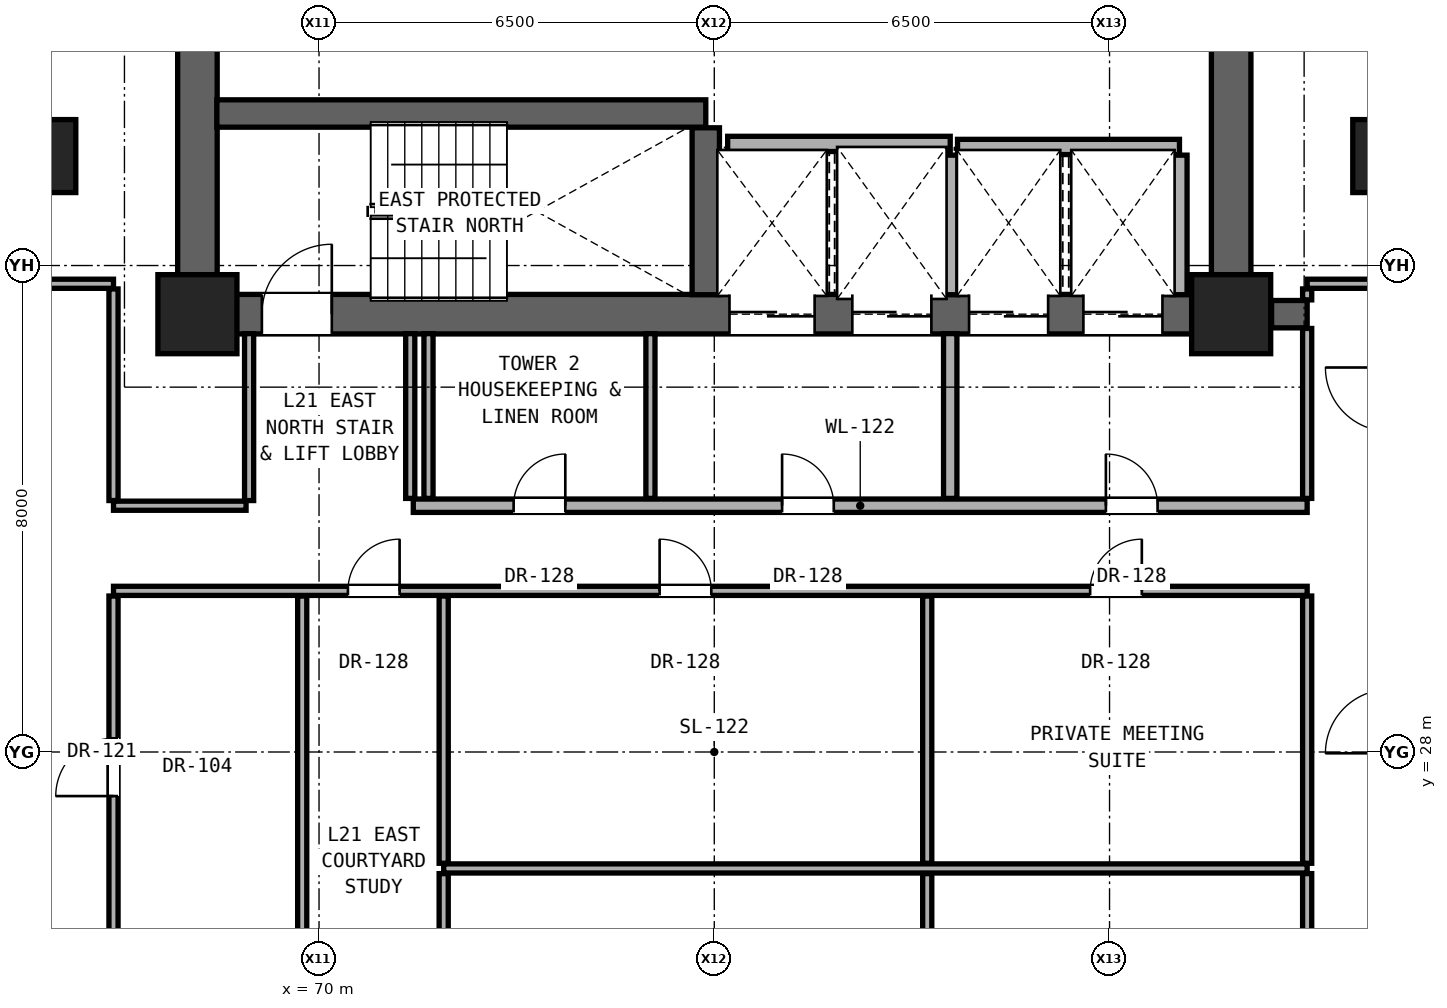
"""IFC4 building model, lengths in metres.
Left out: names, types, materials, properties, quantities, classifications, styles, units other than length and angle.
Written with IfcOpenShell. Run it as: python <this file> out.ifc"""

import sys

from ifc_helpers import new_model, si_unit, direction, frame, frame_2d, origin, origin_2d, place, context, subcontext, project, spatial, rectangle, extrude, element, fill, save


model = new_model("IFC4")
c1 = context("Model", 3, precision=1e-05, world=origin(), true_north=direction((0.0, 1.0)))
c2 = subcontext(c1, "Body", "Model", "MODEL_VIEW")
j1 = project(units=[si_unit("LENGTHUNIT", "METRE"), si_unit("PLANEANGLEUNIT", "RADIAN")], contexts=[c1])
p1 = place(None, origin())
s1 = spatial("IfcSite", under=j1, at=p1, CompositionType="ELEMENT")
p2 = place(p1, origin())
s2 = spatial("IfcBuilding", under=s1, at=p2, CompositionType="ELEMENT")
p3 = place(p2, frame((0.0, 0.0, 75.2)))
s3 = spatial("IfcBuildingStorey", under=s2, at=p3, CompositionType="ELEMENT", Elevation=75.2)
for number, where, z_axis, x_axis in (
    (1, (68.0, 35.2, 0.0), (0.0, 0.0, 1.0), (1.0, 0.0, 0.0)),
    (2, (85.0, 35.2, 0.0), (0.0, 0.0, 1.0), (1.0, 0.0, 0.0)),
):
    element("IfcColumn", number, at=place(p3, frame(where, z_axis=z_axis, x_axis=x_axis)), inside=s3, PredefinedType="COLUMN", context=c2, shape_type="SweptSolid", body=[
        extrude(rectangle(XDim=1.3, YDim=1.3, at=origin_2d()), origin(), (0.0, 0.0, 1.0), 3.3),
    ])
for number, where, z_axis, x_axis in (
    (3, (65.6, 37.8, 0.0), (0.0, 0.0, 1.0), (1.0, 0.0, 0.0)),
    (4, (87.4, 37.8, 0.0), (0.0, 0.0, 1.0), (1.0, 0.0, 0.0)),
):
    element("IfcColumn", number, at=place(p3, frame(where, z_axis=z_axis, x_axis=x_axis)), inside=s3, PredefinedType="PILASTER", context=c2, shape_type="SweptSolid", body=[
        extrude(rectangle(XDim=0.8, YDim=1.2, at=origin_2d()), origin(), (0.0, 0.0, 1.0), 3.3),
    ])
for number, where, z_axis, x_axis in (
    (5, (68.0, 35.2, 0.0), (0.0, 0.0, 1.0), (0.0, 1.0, 0.0)),
    (6, (85.0, 35.2, 0.0), (0.0, 0.0, 1.0), (0.0, 1.0, 0.0)),
):
    element("IfcWall", number, at=place(p3, frame(where, z_axis=z_axis, x_axis=x_axis)), inside=s3, PredefinedType="SHEAR", context=c2, shape_type="SweptSolid", body=[
        extrude(rectangle(XDim=5.6, YDim=0.65, at=frame_2d((2.8, 0.0))), origin(), (0.0, 0.0, 1.0), 3.06),
    ])
p4 = place(p3, frame((68.0, 35.2, 0.0), z_axis=(0.0, 0.0, 1.0), x_axis=(1.0, 0.0, 0.0)))
e7 = element("IfcWall", 7, at=p4, inside=s3, PredefinedType="SHEAR", context=c2, shape_type="SweptSolid", body=[
    extrude(rectangle(XDim=17.0, YDim=0.65, at=frame_2d((8.5, 0.0))), origin(), (0.0, 0.0, 1.0), 3.06),
])
p5 = place(p4, frame((1.06, 0.0, 0.0)))
e8 = element("IfcOpeningElement", 8, at=p5, cuts=e7, PredefinedType="OPENING", context=c2, shape_type="SweptSolid", body=[
    extrude(rectangle(XDim=1.15, YDim=2.2, at=frame_2d((0.575, 1.1))), frame((0.0, 0.335, 0.0), z_axis=(0.0, -1.0, 0.0), x_axis=(1.0, 0.0, 0.0)), (0.0, 0.0, 1.0), 0.67),
])
p6 = place(p4, frame((8.75, 0.0, 0.0)))
e9 = element("IfcOpeningElement", 9, at=p6, cuts=e7, PredefinedType="OPENING", context=c2, shape_type="SweptSolid", body=[
    extrude(rectangle(XDim=1.4, YDim=2.35, at=frame_2d((0.7, 1.175))), frame((0.0, 0.335, 0.0), z_axis=(0.0, -1.0, 0.0), x_axis=(1.0, 0.0, 0.0)), (0.0, 0.0, 1.0), 0.67),
])
p7 = place(p4, frame((10.77, 0.0, 0.0)))
e10 = element("IfcOpeningElement", 10, at=p7, cuts=e7, PredefinedType="OPENING", context=c2, shape_type="SweptSolid", body=[
    extrude(rectangle(XDim=1.3, YDim=2.3, at=frame_2d((0.65, 1.15))), frame((0.0, 0.335, 0.0), z_axis=(0.0, -1.0, 0.0), x_axis=(1.0, 0.0, 0.0)), (0.0, 0.0, 1.0), 0.67),
])
p8 = place(p4, frame((12.69, 0.0, 0.0)))
e11 = element("IfcOpeningElement", 11, at=p8, cuts=e7, PredefinedType="OPENING", context=c2, shape_type="SweptSolid", body=[
    extrude(rectangle(XDim=1.3, YDim=2.3, at=frame_2d((0.65, 1.15))), frame((0.0, 0.335, 0.0), z_axis=(0.0, -1.0, 0.0), x_axis=(1.0, 0.0, 0.0)), (0.0, 0.0, 1.0), 0.67),
])
p9 = place(p4, frame((14.57, 0.0, 0.0)))
e12 = element("IfcOpeningElement", 12, at=p9, cuts=e7, PredefinedType="OPENING", context=c2, shape_type="SweptSolid", body=[
    extrude(rectangle(XDim=1.3, YDim=2.3, at=frame_2d((0.65, 1.15))), frame((0.0, 0.335, 0.0), z_axis=(0.0, -1.0, 0.0), x_axis=(1.0, 0.0, 0.0)), (0.0, 0.0, 1.0), 0.67),
])
p10 = place(p3, frame((72.05, 26.085, 0.0), z_axis=(0.0, 0.0, 1.0), x_axis=(1.0, 0.0, 0.0)))
e13 = element("IfcWall", 13, at=p10, inside=s3, PredefinedType="PARTITIONING", context=c2, shape_type="SweptSolid", body=[
    extrude(rectangle(XDim=14.2, YDim=0.15, at=frame_2d((7.1, 0.0))), origin(), (0.0, 0.0, 1.0), 2.125),
])
p11 = place(p3, frame((66.62, 30.65, 0.0), z_axis=(0.0, 0.0, 1.0), x_axis=(1.0, 0.0, 0.0)))
e14 = element("IfcWall", 14, at=p11, inside=s3, PredefinedType="PARTITIONING", context=c2, shape_type="SweptSolid", body=[
    extrude(rectangle(XDim=19.63, YDim=0.15, at=frame_2d((9.815, 0.0))), origin(), (0.0, 0.0, 1.0), 2.125),
])
p12 = place(p11, frame((3.855, 0.0, 0.0)))
e15 = element("IfcOpeningElement", 15, at=p12, cuts=e14, PredefinedType="OPENING", context=c2, shape_type="SweptSolid", body=[
    extrude(rectangle(XDim=0.85, YDim=2.01, at=frame_2d((0.425, 1.005))), frame((0.0, 0.085, 0.0), z_axis=(0.0, -1.0, 0.0), x_axis=(1.0, 0.0, 0.0)), (0.0, 0.0, 1.0), 0.17),
])
p13 = place(p11, frame((8.981, 0.0, 0.0)))
e16 = element("IfcOpeningElement", 16, at=p13, cuts=e14, PredefinedType="OPENING", context=c2, shape_type="SweptSolid", body=[
    extrude(rectangle(XDim=0.85, YDim=2.01, at=frame_2d((0.425, 1.005))), frame((0.0, 0.085, 0.0), z_axis=(0.0, -1.0, 0.0), x_axis=(1.0, 0.0, 0.0)), (0.0, 0.0, 1.0), 0.17),
])
p14 = place(p11, frame((16.061, 0.0, 0.0)))
e17 = element("IfcOpeningElement", 17, at=p14, cuts=e14, PredefinedType="OPENING", context=c2, shape_type="SweptSolid", body=[
    extrude(rectangle(XDim=0.85, YDim=2.01, at=frame_2d((0.425, 1.005))), frame((0.0, 0.085, 0.0), z_axis=(0.0, -1.0, 0.0), x_axis=(1.0, 0.0, 0.0)), (0.0, 0.0, 1.0), 0.17),
])
p15 = place(p3, frame((66.62, 32.05, 0.0), z_axis=(0.0, 0.0, 1.0), x_axis=(1.0, 0.0, 0.0)))
e18 = element("IfcWall", 18, at=p15, inside=s3, PredefinedType="PARTITIONING", context=c2, shape_type="SweptSolid", body=[
    extrude(rectangle(XDim=2.18, YDim=0.15, at=frame_2d((1.09, 0.0))), origin(), (0.0, 0.0, 1.0), 2.125),
])
p16 = place(p3, frame((71.55, 32.05, 0.0), z_axis=(0.0, 0.0, 1.0), x_axis=(1.0, 0.0, 0.0)))
e19 = element("IfcWall", 19, at=p16, inside=s3, PredefinedType="SOLIDWALL", context=c2, shape_type="SweptSolid", body=[
    extrude(rectangle(XDim=14.7, YDim=0.22, at=frame_2d((7.35, 0.0))), origin(), (0.0, 0.0, 1.0), 2.125),
])
p17 = place(p16, frame((11.39, 0.0, 0.0)))
e20 = element("IfcOpeningElement", 20, at=p17, cuts=e19, PredefinedType="OPENING", context=c2, shape_type="SweptSolid", body=[
    extrude(rectangle(XDim=0.85, YDim=2.01, at=frame_2d((0.425, 1.005))), frame((0.0, 0.12, 0.0), z_axis=(0.0, -1.0, 0.0), x_axis=(1.0, 0.0, 0.0)), (0.0, 0.0, 1.0), 0.24),
])
p18 = place(p16, frame((6.065, 0.0, 0.0)))
e21 = element("IfcOpeningElement", 21, at=p18, cuts=e19, PredefinedType="OPENING", context=c2, shape_type="SweptSolid", body=[
    extrude(rectangle(XDim=0.85, YDim=2.01, at=frame_2d((0.425, 1.005))), frame((0.0, 0.12, 0.0), z_axis=(0.0, -1.0, 0.0), x_axis=(1.0, 0.0, 0.0)), (0.0, 0.0, 1.0), 0.24),
])
p19 = place(p16, frame((1.65, 0.0, 0.0)))
e22 = element("IfcOpeningElement", 22, at=p19, cuts=e19, PredefinedType="OPENING", context=c2, shape_type="SweptSolid", body=[
    extrude(rectangle(XDim=0.85, YDim=2.01, at=frame_2d((0.425, 1.005))), frame((0.0, 0.12, 0.0), z_axis=(0.0, -1.0, 0.0), x_axis=(1.0, 0.0, 0.0)), (0.0, 0.0, 1.0), 0.24),
])
p20 = place(p3, frame((85.665, 35.2, 0.0), z_axis=(0.0, 0.0, 1.0), x_axis=(1.0, 0.0, 0.0)))
e23 = element("IfcWall", 23, at=p20, inside=s3, PredefinedType="SHEAR", context=c2, shape_type="SweptSolid", body=[
    extrude(rectangle(XDim=0.585, YDim=0.45, at=frame_2d((0.292, 0.0))), origin(), (0.0, 0.0, 1.0), 3.06),
])
p21 = place(p3, frame((65.25, 35.7, 0.0), z_axis=(0.0, 0.0, 1.0), x_axis=(1.0, 0.0, 0.0)))
e24 = element("IfcWall", 24, at=p21, inside=s3, PredefinedType="PARTITIONING", context=c2, shape_type="SweptSolid", body=[
    extrude(rectangle(XDim=1.37, YDim=0.15, at=frame_2d((0.685, 0.0))), origin(), (0.0, 0.0, 1.0), 3.06),
])
p22 = place(p3, frame((86.25, 35.7, 0.0), z_axis=(0.0, 0.0, 1.0), x_axis=(1.0, 0.0, 0.0)))
e25 = element("IfcWall", 25, at=p22, inside=s3, PredefinedType="PARTITIONING", context=c2, shape_type="SweptSolid", body=[
    extrude(rectangle(XDim=1.35, YDim=0.15, at=frame_2d((0.675, 0.0))), origin(), (0.0, 0.0, 1.0), 3.06),
])
p23 = place(p3, frame((80.5, 37.95, 0.0), z_axis=(0.0, 0.0, 1.0), x_axis=(1.0, 0.0, 0.0)))
e26 = element("IfcWall", 26, at=p23, inside=s3, PredefinedType="SOLIDWALL", context=c2, shape_type="SweptSolid", body=[
    extrude(rectangle(XDim=3.65, YDim=0.25, at=frame_2d((1.825, 0.0))), origin(), (0.0, 0.0, 1.0), 3.06),
])
p24 = place(p3, frame((76.72, 38.0, 0.0), z_axis=(0.0, 0.0, 1.0), x_axis=(1.0, 0.0, 0.0)))
e27 = element("IfcWall", 27, at=p24, inside=s3, PredefinedType="SOLIDWALL", context=c2, shape_type="SweptSolid", body=[
    extrude(rectangle(XDim=3.66, YDim=0.25, at=frame_2d((1.83, 0.0))), origin(), (0.0, 0.0, 1.0), 3.06),
])
p25 = place(p3, frame((68.32, 38.5, 0.0), z_axis=(0.0, 0.0, 1.0), x_axis=(1.0, 0.0, 0.0)))
e28 = element("IfcWall", 28, at=p25, inside=s3, PredefinedType="SHEAR", context=c2, shape_type="SweptSolid", body=[
    extrude(rectangle(XDim=8.04, YDim=0.45, at=frame_2d((4.02, 0.0))), origin(), (0.0, 0.0, 1.0), 3.06),
])
p26 = place(p3, frame((66.62, 24.935, 0.0), z_axis=(0.0, 0.0, 1.0), x_axis=(0.0, 1.0, 0.0)))
e29 = element("IfcWall", 29, at=p26, inside=s3, PredefinedType="PARTITIONING", context=c2, shape_type="SweptSolid", body=[
    extrude(rectangle(XDim=5.63, YDim=0.15, at=frame_2d((2.815, 0.0))), origin(), (0.0, 0.0, 1.0), 2.279),
])
p27 = place(p26, frame((2.34, 0.0, 0.0)))
e30 = element("IfcOpeningElement", 30, at=p27, cuts=e29, PredefinedType="OPENING", context=c2, shape_type="SweptSolid", body=[
    extrude(rectangle(XDim=0.95, YDim=2.15, at=frame_2d((0.475, 1.075))), frame((0.0, 0.085, 0.0), z_axis=(0.0, -1.0, 0.0), x_axis=(1.0, 0.0, 0.0)), (0.0, 0.0, 1.0), 0.17),
])
p28 = place(p3, frame((66.62, 32.135, 0.0), z_axis=(0.0, 0.0, 1.0), x_axis=(0.0, 1.0, 0.0)))
e31 = element("IfcWall", 31, at=p28, inside=s3, PredefinedType="PARTITIONING", context=c2, shape_type="SweptSolid", body=[
    extrude(rectangle(XDim=3.48, YDim=0.15, at=frame_2d((1.74, 0.0))), origin(), (0.0, 0.0, 1.0), 2.452),
])
p29 = place(p3, frame((68.85, 32.135, 0.0), z_axis=(0.0, 0.0, 1.0), x_axis=(0.0, 1.0, 0.0)))
e32 = element("IfcWall", 32, at=p29, inside=s3, PredefinedType="PARTITIONING", context=c2, shape_type="SweptSolid", body=[
    extrude(rectangle(XDim=2.745, YDim=0.15, at=frame_2d((1.373, 0.0))), origin(), (0.0, 0.0, 1.0), 3.06),
])
p30 = place(p3, frame((69.723, 24.935, 0.0), z_axis=(0.0, 0.0, 1.0), x_axis=(0.0, 1.0, 0.0)))
e33 = element("IfcWall", 33, at=p30, inside=s3, PredefinedType="PARTITIONING", context=c2, shape_type="SweptSolid", body=[
    extrude(rectangle(XDim=5.63, YDim=0.15, at=frame_2d((2.815, 0.0))), origin(), (0.0, 0.0, 1.0), 2.125),
])
for number, where, z_axis, x_axis in (
    (34, (71.5, 32.17, 0.0), (0.0, 0.0, 1.0), (0.0, 1.0, 0.0)),
    (35, (71.8, 32.17, 0.0), (0.0, 0.0, 1.0), (0.0, 1.0, 0.0)),
):
    element("IfcWall", number, at=place(p3, frame(where, z_axis=z_axis, x_axis=x_axis)), inside=s3, PredefinedType="PARTITIONING", context=c2, shape_type="SweptSolid", body=[
        extrude(rectangle(XDim=2.71, YDim=0.15, at=frame_2d((1.355, 0.0))), origin(), (0.0, 0.0, 1.0), 3.06),
    ])
p31 = place(p3, frame((72.05, 22.435, 0.0), z_axis=(0.0, 0.0, 1.0), x_axis=(0.0, 1.0, 0.0)))
e36 = element("IfcWall", 36, at=p31, inside=s3, PredefinedType="PARTITIONING", context=c2, shape_type="SweptSolid", body=[
    extrude(rectangle(XDim=3.565, YDim=0.15, at=frame_2d((1.782, 0.0))), origin(), (0.0, 0.0, 1.0), 2.589),
])
p32 = place(p3, frame((72.05, 26.17, 0.0), z_axis=(0.0, 0.0, 1.0), x_axis=(0.0, 1.0, 0.0)))
e37 = element("IfcWall", 37, at=p32, inside=s3, PredefinedType="PARTITIONING", context=c2, shape_type="SweptSolid", body=[
    extrude(rectangle(XDim=4.395, YDim=0.15, at=frame_2d((2.198, 0.0))), origin(), (0.0, 0.0, 1.0), 2.125),
])
p33 = place(p3, frame((75.45, 32.17, 0.0), z_axis=(0.0, 0.0, 1.0), x_axis=(0.0, 1.0, 0.0)))
e38 = element("IfcWall", 38, at=p33, inside=s3, PredefinedType="PARTITIONING", context=c2, shape_type="SweptSolid", body=[
    extrude(rectangle(XDim=2.71, YDim=0.15, at=frame_2d((1.355, 0.0))), origin(), (0.0, 0.0, 1.0), 3.06),
])
p34 = place(p3, frame((76.36, 35.52, 0.0), z_axis=(0.0, 0.0, 1.0), x_axis=(0.0, 1.0, 0.0)))
e39 = element("IfcWall", 39, at=p34, inside=s3, PredefinedType="SHEAR", context=c2, shape_type="SweptSolid", body=[
    extrude(rectangle(XDim=2.745, YDim=0.45, at=frame_2d((1.373, 0.0))), origin(), (0.0, 0.0, 1.0), 3.06),
])
p35 = place(p3, frame((80.002, 22.435, 0.0), z_axis=(0.0, 0.0, 1.0), x_axis=(0.0, 1.0, 0.0)))
e40 = element("IfcWall", 40, at=p35, inside=s3, PredefinedType="PARTITIONING", context=c2, shape_type="SweptSolid", body=[
    extrude(rectangle(XDim=3.565, YDim=0.15, at=frame_2d((1.782, 0.0))), origin(), (0.0, 0.0, 1.0), 3.06),
])
p36 = place(p3, frame((80.002, 26.17, 0.0), z_axis=(0.0, 0.0, 1.0), x_axis=(0.0, 1.0, 0.0)))
e41 = element("IfcWall", 41, at=p36, inside=s3, PredefinedType="PARTITIONING", context=c2, shape_type="SweptSolid", body=[
    extrude(rectangle(XDim=4.395, YDim=0.15, at=frame_2d((2.198, 0.0))), origin(), (0.0, 0.0, 1.0), 2.125),
])
p37 = place(p3, frame((80.38, 32.17, 0.0), z_axis=(0.0, 0.0, 1.0), x_axis=(0.0, 1.0, 0.0)))
e42 = element("IfcWall", 42, at=p37, inside=s3, PredefinedType="SOLIDWALL", context=c2, shape_type="SweptSolid", body=[
    extrude(rectangle(XDim=2.71, YDim=0.22, at=frame_2d((1.355, 0.0))), origin(), (0.0, 0.0, 1.0), 3.06),
])
for number, where, z_axis, x_axis in (
    (43, (80.38, 35.52, 0.0), (0.0, 0.0, 1.0), (0.0, 1.0, 0.0)),
    (44, (84.15, 35.52, 0.0), (0.0, 0.0, 1.0), (0.0, 1.0, 0.0)),
):
    element("IfcWall", number, at=place(p3, frame(where, z_axis=z_axis, x_axis=x_axis)), inside=s3, PredefinedType="SOLIDWALL", context=c2, shape_type="SweptSolid", body=[
        extrude(rectangle(XDim=2.295, YDim=0.25, at=frame_2d((1.147, 0.0))), origin(), (0.0, 0.0, 1.0), 3.06),
    ])
p38 = place(p3, frame((86.25, 22.435, 0.0), z_axis=(0.0, 0.0, 1.0), x_axis=(0.0, 1.0, 0.0)))
e45 = element("IfcWall", 45, at=p38, inside=s3, PredefinedType="PARTITIONING", context=c2, shape_type="SweptSolid", body=[
    extrude(rectangle(XDim=3.565, YDim=0.15, at=frame_2d((1.782, 0.0))), origin(), (0.0, 0.0, 1.0), 3.06),
])
p39 = place(p3, frame((86.25, 26.17, 0.0), z_axis=(0.0, 0.0, 1.0), x_axis=(0.0, 1.0, 0.0)))
e46 = element("IfcWall", 46, at=p39, inside=s3, PredefinedType="PARTITIONING", context=c2, shape_type="SweptSolid", body=[
    extrude(rectangle(XDim=4.395, YDim=0.15, at=frame_2d((2.198, 0.0))), origin(), (0.0, 0.0, 1.0), 2.279),
])
p40 = place(p3, frame((86.25, 32.17, 0.0), z_axis=(0.0, 0.0, 1.0), x_axis=(0.0, 1.0, 0.0)))
e47 = element("IfcWall", 47, at=p40, inside=s3, PredefinedType="PARTITIONING", context=c2, shape_type="SweptSolid", body=[
    extrude(rectangle(XDim=2.795, YDim=0.15, at=frame_2d((1.397, 0.0))), origin(), (0.0, 0.0, 1.0), 2.452),
])
p41 = place(p3, frame((86.25, 35.435, 0.0), z_axis=(0.0, 0.0, 1.0), x_axis=(0.0, 1.0, 0.0)))
e48 = element("IfcWall", 48, at=p41, inside=s3, PredefinedType="PARTITIONING", context=c2, shape_type="SweptSolid", body=[
    extrude(rectangle(XDim=0.18, YDim=0.15, at=frame_2d((0.09, 0.0))), origin(), (0.0, 0.0, 1.0), 2.452),
])
p42 = place(p17, origin())
e49 = element("IfcDoor", 49, at=p42, inside=s3, OperationType="SINGLE_SWING_LEFT", PredefinedType="DOOR", context=c2, shape_type="SweptSolid", body=[
    extrude(rectangle(XDim=0.85, YDim=2.01, at=frame_2d((0.425, 1.005))), frame((0.0, 0.025, 0.0), z_axis=(0.0, -1.0, 0.0), x_axis=(1.0, 0.0, 0.0)), (0.0, 0.0, 1.0), 0.05),
])
fill(e20, e49)
p43 = place(p5, origin())
e50 = element("IfcDoor", 50, at=p43, inside=s3, OperationType="SINGLE_SWING_RIGHT", PredefinedType="DOOR", context=c2, shape_type="SweptSolid", body=[
    extrude(rectangle(XDim=1.15, YDim=2.2, at=frame_2d((0.575, 1.1))), frame((0.0, 0.025, 0.0), z_axis=(0.0, -1.0, 0.0), x_axis=(1.0, 0.0, 0.0)), (0.0, 0.0, 1.0), 0.05),
])
fill(e8, e50)
p44 = place(p18, origin())
e51 = element("IfcDoor", 51, at=p44, inside=s3, OperationType="SINGLE_SWING_LEFT", PredefinedType="DOOR", context=c2, shape_type="SweptSolid", body=[
    extrude(rectangle(XDim=0.85, YDim=2.01, at=frame_2d((0.425, 1.005))), frame((0.0, 0.025, 0.0), z_axis=(0.0, -1.0, 0.0), x_axis=(1.0, 0.0, 0.0)), (0.0, 0.0, 1.0), 0.05),
])
fill(e21, e51)
p45 = place(p19, origin())
e52 = element("IfcDoor", 52, at=p45, inside=s3, OperationType="SINGLE_SWING_RIGHT", PredefinedType="DOOR", context=c2, shape_type="SweptSolid", body=[
    extrude(rectangle(XDim=0.85, YDim=2.01, at=frame_2d((0.425, 1.005))), frame((0.0, 0.025, 0.0), z_axis=(0.0, -1.0, 0.0), x_axis=(1.0, 0.0, 0.0)), (0.0, 0.0, 1.0), 0.05),
])
fill(e22, e52)
p46 = place(p27, origin())
e53 = element("IfcDoor", 53, at=p46, inside=s3, OperationType="SINGLE_SWING_LEFT", PredefinedType="DOOR", context=c2, shape_type="SweptSolid", body=[
    extrude(rectangle(XDim=0.95, YDim=2.15, at=frame_2d((0.475, 1.075))), frame((0.0, 0.025, 0.0), z_axis=(0.0, -1.0, 0.0), x_axis=(1.0, 0.0, 0.0)), (0.0, 0.0, 1.0), 0.05),
])
fill(e30, e53)
p47 = place(p12, origin())
e54 = element("IfcDoor", 54, at=p47, inside=s3, OperationType="SINGLE_SWING_RIGHT", PredefinedType="DOOR", context=c2, shape_type="SweptSolid", body=[
    extrude(rectangle(XDim=0.85, YDim=2.01, at=frame_2d((0.425, 1.005))), frame((0.0, 0.025, 0.0), z_axis=(0.0, -1.0, 0.0), x_axis=(1.0, 0.0, 0.0)), (0.0, 0.0, 1.0), 0.05),
])
fill(e15, e54)
p48 = place(p13, origin())
e55 = element("IfcDoor", 55, at=p48, inside=s3, OperationType="SINGLE_SWING_LEFT", PredefinedType="DOOR", context=c2, shape_type="SweptSolid", body=[
    extrude(rectangle(XDim=0.85, YDim=2.01, at=frame_2d((0.425, 1.005))), frame((0.0, 0.025, 0.0), z_axis=(0.0, -1.0, 0.0), x_axis=(1.0, 0.0, 0.0)), (0.0, 0.0, 1.0), 0.05),
])
fill(e16, e55)
p49 = place(p14, origin())
e56 = element("IfcDoor", 56, at=p49, inside=s3, OperationType="SINGLE_SWING_RIGHT", PredefinedType="DOOR", context=c2, shape_type="SweptSolid", body=[
    extrude(rectangle(XDim=0.85, YDim=2.01, at=frame_2d((0.425, 1.005))), frame((0.0, 0.025, 0.0), z_axis=(0.0, -1.0, 0.0), x_axis=(1.0, 0.0, 0.0)), (0.0, 0.0, 1.0), 0.05),
])
fill(e17, e56)
p50 = place(p6, origin())
e57 = element("IfcDoor", 57, at=p50, inside=s3, OperationType="DOUBLE_DOOR_SLIDING", PredefinedType="DOOR", context=c2, shape_type="SweptSolid", body=[
    extrude(rectangle(XDim=1.4, YDim=2.35, at=frame_2d((0.7, 1.175))), frame((0.0, 0.025, 0.0), z_axis=(0.0, -1.0, 0.0), x_axis=(1.0, 0.0, 0.0)), (0.0, 0.0, 1.0), 0.05),
])
fill(e9, e57)
p51 = place(p7, origin())
e58 = element("IfcDoor", 58, at=p51, inside=s3, OperationType="DOUBLE_DOOR_SLIDING", PredefinedType="DOOR", context=c2, shape_type="SweptSolid", body=[
    extrude(rectangle(XDim=1.3, YDim=2.3, at=frame_2d((0.65, 1.15))), frame((0.0, 0.025, 0.0), z_axis=(0.0, -1.0, 0.0), x_axis=(1.0, 0.0, 0.0)), (0.0, 0.0, 1.0), 0.05),
])
fill(e10, e58)
p52 = place(p8, origin())
e59 = element("IfcDoor", 59, at=p52, inside=s3, OperationType="DOUBLE_DOOR_SLIDING", PredefinedType="DOOR", context=c2, shape_type="SweptSolid", body=[
    extrude(rectangle(XDim=1.3, YDim=2.3, at=frame_2d((0.65, 1.15))), frame((0.0, 0.025, 0.0), z_axis=(0.0, -1.0, 0.0), x_axis=(1.0, 0.0, 0.0)), (0.0, 0.0, 1.0), 0.05),
])
fill(e11, e59)
p53 = place(p9, origin())
e60 = element("IfcDoor", 60, at=p53, inside=s3, OperationType="DOUBLE_DOOR_SLIDING", PredefinedType="DOOR", context=c2, shape_type="SweptSolid", body=[
    extrude(rectangle(XDim=1.3, YDim=2.3, at=frame_2d((0.65, 1.15))), frame((0.0, 0.025, 0.0), z_axis=(0.0, -1.0, 0.0), x_axis=(1.0, 0.0, 0.0)), (0.0, 0.0, 1.0), 0.05),
])
fill(e12, e60)
save(model, sys.argv[1])
